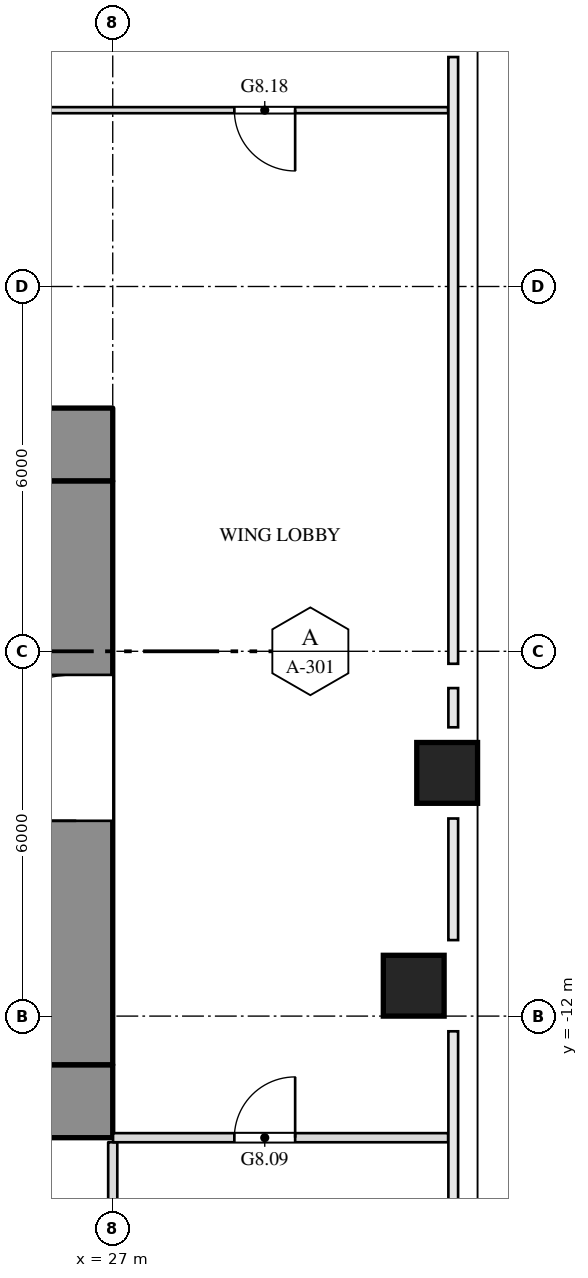
"""IFC4 building model, lengths in metres.
Left out: names, types, materials, properties, quantities, classifications, styles, units other than length and angle.
Written with IfcOpenShell. Run it as: python <this file> out.ifc"""

import sys

from ifc_helpers import new_model, si_unit, direction, frame, frame_2d, origin, origin_2d, place, context, subcontext, project, spatial, rectangle, extrude, element, fill, save


model = new_model("IFC4")
c1 = context("Model", 3, precision=1e-05, world=origin(), true_north=direction((0.0, 1.0)))
c2 = subcontext(c1, "Body", "Model", "MODEL_VIEW")
j1 = project(units=[si_unit("LENGTHUNIT", "METRE"), si_unit("PLANEANGLEUNIT", "RADIAN")], contexts=[c1])
p1 = place(None, origin())
s1 = spatial("IfcSite", under=j1, at=p1, CompositionType="ELEMENT")
p2 = place(p1, origin())
s2 = spatial("IfcBuilding", under=s1, at=p2, CompositionType="ELEMENT")
p3 = place(p2, frame((0.0, 0.0, 48.0)))
s3 = spatial("IfcBuildingStorey", under=s2, at=p3, CompositionType="ELEMENT", Elevation=48.0)
for number, where, z_axis, x_axis in (
    (1, (31.95, -11.5, 0.0), (0.0, 0.0, 1.0), (1.0, 0.0, 0.0)),
    (2, (32.5, -8.0, 0.0), (0.0, 0.0, 1.0), (1.0, 0.0, 0.0)),
):
    element("IfcColumn", number, at=place(p3, frame(where, z_axis=z_axis, x_axis=x_axis)), inside=s3, PredefinedType="COLUMN", context=c2, shape_type="SweptSolid", body=[
        extrude(rectangle(XDim=1.0, YDim=1.0, at=origin_2d()), origin(), (0.0, 0.0, 1.0), 4.5),
    ])
p4 = place(p3, frame((-27.0, -2.6, 0.0), z_axis=(0.0, 0.0, 1.0), x_axis=(1.0, 0.0, 0.0)))
e3 = element("IfcWall", 3, at=p4, inside=s3, PredefinedType="SHEAR", context=c2, shape_type="SweptSolid", body=[
    extrude(rectangle(XDim=54.0, YDim=1.2, at=frame_2d((27.0, 0.0))), origin(), (0.0, 0.0, 1.0), 4.3),
])
p5 = place(p4, frame((15.15, 0.0, 0.0)))
e4 = element("IfcOpeningElement", 4, at=p5, cuts=e3, PredefinedType="OPENING", context=c2, shape_type="SweptSolid", body=[
    extrude(rectangle(XDim=2.4, YDim=2.1, at=frame_2d((1.2, 1.05))), frame((0.0, 0.612, 0.0), z_axis=(0.0, -1.0, 0.0), x_axis=(1.0, 0.0, 0.0)), (0.0, 0.0, 1.0), 1.224),
])
p6 = place(p4, frame((36.45, 0.0, 0.0)))
e5 = element("IfcOpeningElement", 5, at=p6, cuts=e3, PredefinedType="OPENING", context=c2, shape_type="SweptSolid", body=[
    extrude(rectangle(XDim=2.4, YDim=2.1, at=frame_2d((1.2, 1.05))), frame((0.0, 0.612, 0.0), z_axis=(0.0, -1.0, 0.0), x_axis=(1.0, 0.0, 0.0)), (0.0, 0.0, 1.0), 1.224),
])
p7 = place(p3, frame((-27.0, -13.4, 0.0), z_axis=(0.0, 0.0, 1.0), x_axis=(1.0, 0.0, 0.0)))
e6 = element("IfcWall", 6, at=p7, inside=s3, PredefinedType="SHEAR", context=c2, shape_type="SweptSolid", body=[
    extrude(rectangle(XDim=54.0, YDim=1.2, at=frame_2d((27.0, 0.0))), origin(), (0.0, 0.0, 1.0), 4.3),
])
p8 = place(p7, frame((16.45, 0.0, 0.0)))
e7 = element("IfcOpeningElement", 7, at=p8, cuts=e6, PredefinedType="OPENING", context=c2, shape_type="SweptSolid", body=[
    extrude(rectangle(XDim=1.0, YDim=2.1, at=frame_2d((0.5, 1.05))), frame((0.0, 0.612, 0.0), z_axis=(0.0, -1.0, 0.0), x_axis=(1.0, 0.0, 0.0)), (0.0, 0.0, 1.0), 1.224),
])
p9 = place(p7, frame((36.55, 0.0, 0.0)))
e8 = element("IfcOpeningElement", 8, at=p9, cuts=e6, PredefinedType="OPENING", context=c2, shape_type="SweptSolid", body=[
    extrude(rectangle(XDim=1.0, YDim=2.1, at=frame_2d((0.5, 1.05))), frame((0.0, 0.612, 0.0), z_axis=(0.0, -1.0, 0.0), x_axis=(1.0, 0.0, 0.0)), (0.0, 0.0, 1.0), 1.224),
])
p10 = place(p3, frame((26.4, -12.8, 0.0), z_axis=(0.0, 0.0, 1.0), x_axis=(0.0, 1.0, 0.0)))
e9 = element("IfcWall", 9, at=p10, inside=s3, PredefinedType="SHEAR", context=c2, shape_type="SweptSolid", body=[
    extrude(rectangle(XDim=9.6, YDim=1.2, at=frame_2d((4.8, 0.0))), origin(), (0.0, 0.0, 1.0), 4.3),
])
p11 = place(p10, frame((4.012, 0.0, 0.0)))
e10 = element("IfcOpeningElement", 10, at=p11, cuts=e9, PredefinedType="OPENING", context=c2, shape_type="SweptSolid", body=[
    extrude(rectangle(XDim=2.4, YDim=2.1, at=frame_2d((1.2, 1.05))), frame((0.0, 0.612, 0.0), z_axis=(0.0, -1.0, 0.0), x_axis=(1.0, 0.0, 0.0)), (0.0, 0.0, 1.0), 1.224),
])
p12 = place(p3, frame((27.0, -17.0, 0.0), z_axis=(0.0, 0.0, 1.0), x_axis=(0.0, 1.0, 0.0)))
e11 = element("IfcWall", 11, at=p12, inside=s3, PredefinedType="PARTITIONING", context=c2, shape_type="SweptSolid", body=[
    extrude(rectangle(XDim=2.925, YDim=0.15, at=frame_2d((1.462, 0.0))), origin(), (0.0, 0.0, 1.0), 3.688),
])
p13 = place(p3, frame((27.005, -14.0, 0.0), z_axis=(0.0, 0.0, 1.0), x_axis=(1.0, 0.0, 0.0)))
e12 = element("IfcWall", 12, at=p13, inside=s3, PredefinedType="PARTITIONING", context=c2, shape_type="SweptSolid", body=[
    extrude(rectangle(XDim=5.511, YDim=0.15, at=frame_2d((2.756, 0.0))), origin(), (0.0, 0.0, 1.0), 4.3),
])
p14 = place(p13, frame((1.995, 0.0, 0.0)))
e13 = element("IfcOpeningElement", 13, at=p14, cuts=e12, PredefinedType="OPENING", context=c2, shape_type="SweptSolid", body=[
    extrude(rectangle(XDim=1.0, YDim=2.1, at=frame_2d((0.5, 1.05))), frame((0.0, 0.087, 0.0), z_axis=(0.0, -1.0, 0.0), x_axis=(1.0, 0.0, 0.0)), (0.0, 0.0, 1.0), 0.174),
])
p15 = place(p3, frame((-32.516, 2.9, 0.0), z_axis=(0.0, 0.0, 1.0), x_axis=(1.0, 0.0, 0.0)))
e14 = element("IfcWall", 14, at=p15, inside=s3, PredefinedType="PARTITIONING", context=c2, shape_type="SweptSolid", body=[
    extrude(rectangle(XDim=65.032, YDim=0.1, at=frame_2d((32.516, 0.0))), origin(), (0.0, 0.0, 1.0), 4.3),
])
p16 = place(p15, frame((2.516, 0.0, 0.0)))
e15 = element("IfcOpeningElement", 15, at=p16, cuts=e14, PredefinedType="OPENING", context=c2, shape_type="SweptSolid", body=[
    extrude(rectangle(XDim=1.0, YDim=2.1, at=frame_2d((0.5, 1.05))), frame((0.0, 0.062, 0.0), z_axis=(0.0, -1.0, 0.0), x_axis=(1.0, 0.0, 0.0)), (0.0, 0.0, 1.0), 0.124),
])
p17 = place(p15, frame((8.616, 0.0, 0.0)))
e16 = element("IfcOpeningElement", 16, at=p17, cuts=e14, PredefinedType="OPENING", context=c2, shape_type="SweptSolid", body=[
    extrude(rectangle(XDim=1.8, YDim=2.1, at=frame_2d((0.9, 1.05))), frame((0.0, 0.062, 0.0), z_axis=(0.0, -1.0, 0.0), x_axis=(1.0, 0.0, 0.0)), (0.0, 0.0, 1.0), 0.124),
])
p18 = place(p15, frame((17.466, 0.0, 0.0)))
e17 = element("IfcOpeningElement", 17, at=p18, cuts=e14, PredefinedType="OPENING", context=c2, shape_type="SweptSolid", body=[
    extrude(rectangle(XDim=2.1, YDim=2.4, at=frame_2d((1.05, 1.2))), frame((0.0, 0.062, 0.0), z_axis=(0.0, -1.0, 0.0), x_axis=(1.0, 0.0, 0.0)), (0.0, 0.0, 1.0), 0.124),
])
p19 = place(p15, frame((26.966, 0.0, 0.0)))
e18 = element("IfcOpeningElement", 18, at=p19, cuts=e14, PredefinedType="OPENING", context=c2, shape_type="SweptSolid", body=[
    extrude(rectangle(XDim=2.1, YDim=2.4, at=frame_2d((1.05, 1.2))), frame((0.0, 0.062, 0.0), z_axis=(0.0, -1.0, 0.0), x_axis=(1.0, 0.0, 0.0)), (0.0, 0.0, 1.0), 0.124),
])
p20 = place(p15, frame((36.116, 0.0, 0.0)))
e19 = element("IfcOpeningElement", 19, at=p20, cuts=e14, PredefinedType="OPENING", context=c2, shape_type="SweptSolid", body=[
    extrude(rectangle(XDim=1.8, YDim=2.1, at=frame_2d((0.9, 1.05))), frame((0.0, 0.062, 0.0), z_axis=(0.0, -1.0, 0.0), x_axis=(1.0, 0.0, 0.0)), (0.0, 0.0, 1.0), 0.124),
])
p21 = place(p15, frame((43.016, 0.0, 0.0)))
e20 = element("IfcOpeningElement", 20, at=p21, cuts=e14, PredefinedType="OPENING", context=c2, shape_type="SweptSolid", body=[
    extrude(rectangle(XDim=1.0, YDim=2.1, at=frame_2d((0.5, 1.05))), frame((0.0, 0.062, 0.0), z_axis=(0.0, -1.0, 0.0), x_axis=(1.0, 0.0, 0.0)), (0.0, 0.0, 1.0), 0.124),
])
p22 = place(p15, frame((47.966, 0.0, 0.0)))
e21 = element("IfcOpeningElement", 21, at=p22, cuts=e14, PredefinedType="OPENING", context=c2, shape_type="SweptSolid", body=[
    extrude(rectangle(XDim=2.1, YDim=2.4, at=frame_2d((1.05, 1.2))), frame((0.0, 0.062, 0.0), z_axis=(0.0, -1.0, 0.0), x_axis=(1.0, 0.0, 0.0)), (0.0, 0.0, 1.0), 0.124),
])
p23 = place(p15, frame((54.466, 0.0, 0.0)))
e22 = element("IfcOpeningElement", 22, at=p23, cuts=e14, PredefinedType="OPENING", context=c2, shape_type="SweptSolid", body=[
    extrude(rectangle(XDim=2.1, YDim=2.4, at=frame_2d((1.05, 1.2))), frame((0.0, 0.062, 0.0), z_axis=(0.0, -1.0, 0.0), x_axis=(1.0, 0.0, 0.0)), (0.0, 0.0, 1.0), 0.124),
])
p24 = place(p15, frame((61.516, 0.0, 0.0)))
e23 = element("IfcOpeningElement", 23, at=p24, cuts=e14, PredefinedType="OPENING", context=c2, shape_type="SweptSolid", body=[
    extrude(rectangle(XDim=1.0, YDim=2.1, at=frame_2d((0.5, 1.05))), frame((0.0, 0.062, 0.0), z_axis=(0.0, -1.0, 0.0), x_axis=(1.0, 0.0, 0.0)), (0.0, 0.0, 1.0), 0.124),
])
p25 = place(p14, origin())
e24 = element("IfcDoor", 24, at=p25, inside=s3, OperationType="SINGLE_SWING_RIGHT", PredefinedType="DOOR", context=c2, shape_type="SweptSolid", body=[
    extrude(rectangle(XDim=1.0, YDim=2.1, at=frame_2d((0.5, 1.05))), frame((0.0, 0.025, 0.0), z_axis=(0.0, -1.0, 0.0), x_axis=(1.0, 0.0, 0.0)), (0.0, 0.0, 1.0), 0.05),
])
fill(e13, e24)
p26 = place(p24, origin())
e25 = element("IfcDoor", 25, at=p26, inside=s3, OperationType="SINGLE_SWING_LEFT", PredefinedType="DOOR", context=c2, shape_type="SweptSolid", body=[
    extrude(rectangle(XDim=1.0, YDim=2.1, at=frame_2d((0.5, 1.05))), frame((0.0, 0.025, 0.0), z_axis=(0.0, -1.0, 0.0), x_axis=(1.0, 0.0, 0.0)), (0.0, 0.0, 1.0), 0.05),
])
fill(e23, e25)
p27 = place(p11, origin())
e26 = element("IfcDoor", 26, at=p27, inside=s3, OperationType="DOUBLE_DOOR_SINGLE_SWING", PredefinedType="DOOR", context=c2, shape_type="SweptSolid", body=[
    extrude(rectangle(XDim=2.4, YDim=2.1, at=frame_2d((1.2, 1.05))), frame((0.0, 0.025, 0.0), z_axis=(0.0, -1.0, 0.0), x_axis=(1.0, 0.0, 0.0)), (0.0, 0.0, 1.0), 0.05),
])
fill(e10, e26)
save(model, sys.argv[1])
